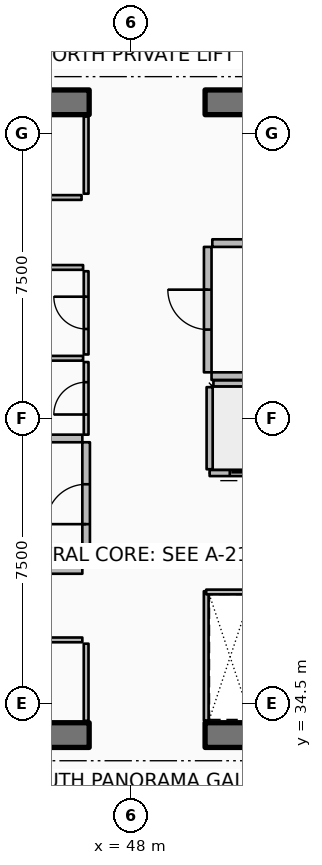
"""IFC4 building model, lengths in metres.
Left out: names, types, materials, properties, quantities, classifications, styles, units other than length and angle.
Written with IfcOpenShell. Run it as: python <this file> out.ifc"""

import sys

from ifc_helpers import new_model, si_unit, direction, frame, frame_2d, origin, place, context, subcontext, project, spatial, rectangle, extrude, element, fill, save


model = new_model("IFC4")
c1 = context("Model", 3, precision=1e-05, world=origin(), true_north=direction((0.0, 1.0)))
c2 = subcontext(c1, "Body", "Model", "MODEL_VIEW")
j1 = project(units=[si_unit("LENGTHUNIT", "METRE"), si_unit("PLANEANGLEUNIT", "RADIAN")], contexts=[c1])
p1 = place(None, origin())
s1 = spatial("IfcSite", under=j1, at=p1, CompositionType="ELEMENT")
p2 = place(p1, origin())
s2 = spatial("IfcBuilding", under=s1, at=p2, CompositionType="ELEMENT")
p3 = place(p2, frame((0.0, 0.0, 263.65)))
s3 = spatial("IfcBuildingStorey", under=s2, at=p3, CompositionType="ELEMENT", Elevation=263.65)
for number, where, z_axis, x_axis in (
    (1, (37.15, 33.675, 0.0), (0.0, 0.0, 1.0), (1.0, 0.0, 0.0)),
    (2, (49.95, 33.675, 0.0), (0.0, 0.0, 1.0), (1.0, 0.0, 0.0)),
    (3, (37.15, 50.325, 0.0), (0.0, 0.0, 1.0), (1.0, 0.0, 0.0)),
    (4, (49.95, 50.325, 0.0), (0.0, 0.0, 1.0), (1.0, 0.0, 0.0)),
):
    element("IfcWall", number, at=place(p3, frame(where, z_axis=z_axis, x_axis=x_axis)), inside=s3, PredefinedType="SHEAR", context=c2, shape_type="SweptSolid", body=[
        extrude(rectangle(XDim=9.75, YDim=0.65, at=frame_2d((4.875, 0.0))), origin(), (0.0, 0.0, 1.0), 3.85),
    ])
p4 = place(p3, frame((52.23, 40.57, 0.0), z_axis=(0.0, 0.0, 1.0), x_axis=(-1.0, 0.0, 0.0)))
e5 = element("IfcWall", 5, at=p4, inside=s3, PredefinedType="PARTITIONING", context=c2, shape_type="SweptSolid", body=[
    extrude(rectangle(XDim=2.16, YDim=0.16, at=frame_2d((1.08, 0.0))), origin(), (0.0, 0.0, 1.0), 3.59),
])
p5 = place(p4, frame((0.53, 0.0, 0.0)))
e6 = element("IfcOpeningElement", 6, at=p5, cuts=e5, PredefinedType="OPENING", context=c2, shape_type="SweptSolid", body=[
    extrude(rectangle(XDim=1.1, YDim=2.1, at=frame_2d((0.55, 1.05))), frame((0.0, 0.09, 0.0), z_axis=(0.0, -1.0, 0.0), x_axis=(1.0, 0.0, 0.0)), (0.0, 0.0, 1.0), 0.18),
])
p6 = place(p3, frame((50.07, 40.67, 0.0), z_axis=(0.0, 0.0, 1.0), x_axis=(0.0, 1.0, 0.0)))
e7 = element("IfcWall", 7, at=p6, inside=s3, PredefinedType="PARTITIONING", context=c2, shape_type="SweptSolid", body=[
    extrude(rectangle(XDim=2.16, YDim=0.16, at=frame_2d((1.08, 0.0))), origin(), (0.0, 0.0, 1.0), 3.59),
])
p7 = place(p3, frame((50.17, 42.93, 0.0), z_axis=(0.0, 0.0, 1.0), x_axis=(1.0, 0.0, 0.0)))
e8 = element("IfcWall", 8, at=p7, inside=s3, PredefinedType="PARTITIONING", context=c2, shape_type="SweptSolid", body=[
    extrude(rectangle(XDim=1.96, YDim=0.16, at=frame_2d((0.98, 0.0))), origin(), (0.0, 0.0, 1.0), 3.59),
])
p8 = place(p3, frame((46.82, 34.05, 0.0), z_axis=(0.0, 0.0, 1.0), x_axis=(0.0, 1.0, 0.0)))
e9 = element("IfcWall", 9, at=p8, inside=s3, PredefinedType="PARTITIONING", context=c2, shape_type="SweptSolid", body=[
    extrude(rectangle(XDim=2.03, YDim=0.125, at=frame_2d((1.015, 0.0))), origin(), (0.0, 0.0, 1.0), 3.03),
])
p9 = place(p3, frame((37.92, 36.18, 0.0), z_axis=(0.0, 0.0, 1.0), x_axis=(1.0, 0.0, 0.0)))
e10 = element("IfcWall", 10, at=p9, inside=s3, PredefinedType="PARTITIONING", context=c2, shape_type="SweptSolid", body=[
    extrude(rectangle(XDim=8.8, YDim=0.125, at=frame_2d((4.4, 0.0))), origin(), (0.0, 0.0, 1.0), 3.03),
])
p10 = place(p9, frame((3.975, 0.0, 0.0)))
e11 = element("IfcOpeningElement", 11, at=p10, cuts=e10, PredefinedType="OPENING", context=c2, shape_type="SweptSolid", body=[
    extrude(rectangle(XDim=0.85, YDim=2.06, at=frame_2d((0.425, 1.03))), frame((0.0, 0.073, 0.0), z_axis=(0.0, -1.0, 0.0), x_axis=(1.0, 0.0, 0.0)), (0.0, 0.0, 1.0), 0.145),
])
p11 = place(p3, frame((46.82, 47.92, 0.0), z_axis=(0.0, 0.0, 1.0), x_axis=(0.0, 1.0, 0.0)))
e12 = element("IfcWall", 12, at=p11, inside=s3, PredefinedType="PARTITIONING", context=c2, shape_type="SweptSolid", body=[
    extrude(rectangle(XDim=2.03, YDim=0.125, at=frame_2d((1.015, 0.0))), origin(), (0.0, 0.0, 1.0), 3.03),
])
p12 = place(p3, frame((42.2, 47.82, 0.0), z_axis=(0.0, 0.0, 1.0), x_axis=(1.0, 0.0, 0.0)))
e13 = element("IfcWall", 13, at=p12, inside=s3, PredefinedType="PARTITIONING", context=c2, shape_type="SweptSolid", body=[
    extrude(rectangle(XDim=4.5, YDim=0.125, at=frame_2d((2.25, 0.0))), origin(), (0.0, 0.0, 1.0), 3.03),
])
p13 = place(p12, frame((1.825, 0.0, 0.0)))
e14 = element("IfcOpeningElement", 14, at=p13, cuts=e13, PredefinedType="OPENING", context=c2, shape_type="SweptSolid", body=[
    extrude(rectangle(XDim=0.85, YDim=2.06, at=frame_2d((0.425, 1.03))), frame((0.0, 0.073, 0.0), z_axis=(0.0, -1.0, 0.0), x_axis=(1.0, 0.0, 0.0)), (0.0, 0.0, 1.0), 0.145),
])
p14 = place(p3, frame((41.35, 38.02, 0.0), z_axis=(0.0, 0.0, 1.0), x_axis=(1.0, 0.0, 0.0)))
e15 = element("IfcWall", 15, at=p14, inside=s3, PredefinedType="PARTITIONING", context=c2, shape_type="SweptSolid", body=[
    extrude(rectangle(XDim=5.37, YDim=0.2, at=frame_2d((2.685, 0.0))), origin(), (0.0, 0.0, 1.0), 3.59),
])
p15 = place(p3, frame((43.92, 41.48, 0.0), z_axis=(0.0, 0.0, 1.0), x_axis=(1.0, 0.0, 0.0)))
e16 = element("IfcWall", 16, at=p15, inside=s3, PredefinedType="PARTITIONING", context=c2, shape_type="SweptSolid", body=[
    extrude(rectangle(XDim=2.8, YDim=0.2, at=frame_2d((1.4, 0.0))), origin(), (0.0, 0.0, 1.0), 3.59),
])
p16 = place(p3, frame((46.82, 38.12, 0.0), z_axis=(0.0, 0.0, 1.0), x_axis=(0.0, 1.0, 0.0)))
e17 = element("IfcWall", 17, at=p16, inside=s3, PredefinedType="PARTITIONING", context=c2, shape_type="SweptSolid", body=[
    extrude(rectangle(XDim=3.26, YDim=0.2, at=frame_2d((1.63, 0.0))), origin(), (0.0, 0.0, 1.0), 3.59),
])
p17 = place(p16, frame((1.105, 0.0, 0.0)))
e18 = element("IfcOpeningElement", 18, at=p17, cuts=e17, PredefinedType="OPENING", context=c2, shape_type="SweptSolid", body=[
    extrude(rectangle(XDim=1.05, YDim=2.1, at=frame_2d((0.525, 1.05))), frame((0.0, 0.11, 0.0), z_axis=(0.0, -1.0, 0.0), x_axis=(1.0, 0.0, 0.0)), (0.0, 0.0, 1.0), 0.22),
])
p18 = place(p3, frame((50.12, 43.12, 0.0), z_axis=(0.0, 0.0, 1.0), x_axis=(1.0, 0.0, 0.0)))
e19 = element("IfcWall", 19, at=p18, inside=s3, PredefinedType="PARTITIONING", context=c2, shape_type="SweptSolid", body=[
    extrude(rectangle(XDim=8.88, YDim=0.2, at=frame_2d((4.44, 0.0))), origin(), (0.0, 0.0, 1.0), 3.59),
])
p19 = place(p3, frame((50.14, 46.62, 0.0), z_axis=(0.0, 0.0, 1.0), x_axis=(1.0, 0.0, 0.0)))
e20 = element("IfcWall", 20, at=p19, inside=s3, PredefinedType="PARTITIONING", context=c2, shape_type="SweptSolid", body=[
    extrude(rectangle(XDim=1.02, YDim=0.2, at=frame_2d((0.51, 0.0))), origin(), (0.0, 0.0, 1.0), 3.59),
])
p20 = place(p3, frame((50.02, 43.22, 0.0), z_axis=(0.0, 0.0, 1.0), x_axis=(0.0, 1.0, 0.0)))
e21 = element("IfcWall", 21, at=p20, inside=s3, PredefinedType="PARTITIONING", context=c2, shape_type="SweptSolid", body=[
    extrude(rectangle(XDim=3.3, YDim=0.2, at=frame_2d((1.65, 0.0))), origin(), (0.0, 0.0, 1.0), 3.59),
])
p21 = place(p20, frame((1.125, 0.0, 0.0)))
e22 = element("IfcOpeningElement", 22, at=p21, cuts=e21, PredefinedType="OPENING", context=c2, shape_type="SweptSolid", body=[
    extrude(rectangle(XDim=1.05, YDim=2.1, at=frame_2d((0.525, 1.05))), frame((0.0, 0.11, 0.0), z_axis=(0.0, -1.0, 0.0), x_axis=(1.0, 0.0, 0.0)), (0.0, 0.0, 1.0), 0.22),
])
p22 = place(p3, frame((49.98, 34.06, 0.0), z_axis=(0.0, 0.0, 1.0), x_axis=(0.0, 1.0, 0.0)))
e23 = element("IfcWall", 23, at=p22, inside=s3, PredefinedType="PARTITIONING", context=c2, shape_type="SweptSolid", body=[
    extrude(rectangle(XDim=3.4, YDim=0.125, at=frame_2d((1.7, 0.0))), origin(), (0.0, 0.0, 1.0), 3.03),
])
p23 = place(p3, frame((49.98, 37.44, 0.0), z_axis=(0.0, 0.0, 1.0), x_axis=(1.0, 0.0, 0.0)))
e24 = element("IfcWall", 24, at=p23, inside=s3, PredefinedType="PARTITIONING", context=c2, shape_type="SweptSolid", body=[
    extrude(rectangle(XDim=1.26, YDim=0.125, at=frame_2d((0.63, 0.0))), origin(), (0.0, 0.0, 1.0), 3.03),
])
p24 = place(p3, frame((44.03, 43.59, 0.0), z_axis=(0.0, 0.0, 1.0), x_axis=(1.0, 0.0, 0.0)))
e25 = element("IfcWall", 25, at=p24, inside=s3, PredefinedType="PARTITIONING", context=c2, shape_type="SweptSolid", body=[
    extrude(rectangle(XDim=2.71, YDim=0.125, at=frame_2d((1.355, 0.0))), origin(), (0.0, 0.0, 1.0), 3.03),
])
p25 = place(p3, frame((46.82, 41.58, 0.0), z_axis=(0.0, 0.0, 1.0), x_axis=(0.0, 1.0, 0.0)))
e26 = element("IfcWall", 26, at=p25, inside=s3, PredefinedType="PARTITIONING", context=c2, shape_type="SweptSolid", body=[
    extrude(rectangle(XDim=1.91, YDim=0.125, at=frame_2d((0.955, 0.0))), origin(), (0.0, 0.0, 1.0), 3.03),
])
p26 = place(p25, frame((0.53, 0.0, 0.0)))
e27 = element("IfcOpeningElement", 27, at=p26, cuts=e26, PredefinedType="OPENING", context=c2, shape_type="SweptSolid", body=[
    extrude(rectangle(XDim=0.85, YDim=2.06, at=frame_2d((0.425, 1.03))), frame((0.0, 0.073, 0.0), z_axis=(0.0, -1.0, 0.0), x_axis=(1.0, 0.0, 0.0)), (0.0, 0.0, 1.0), 0.145),
])
p27 = place(p3, frame((46.82, 43.69, 0.0), z_axis=(0.0, 0.0, 1.0), x_axis=(0.0, 1.0, 0.0)))
e28 = element("IfcWall", 28, at=p27, inside=s3, PredefinedType="PARTITIONING", context=c2, shape_type="SweptSolid", body=[
    extrude(rectangle(XDim=2.19, YDim=0.125, at=frame_2d((1.095, 0.0))), origin(), (0.0, 0.0, 1.0), 3.03),
])
p28 = place(p27, frame((0.67, 0.0, 0.0)))
e29 = element("IfcOpeningElement", 29, at=p28, cuts=e28, PredefinedType="OPENING", context=c2, shape_type="SweptSolid", body=[
    extrude(rectangle(XDim=0.85, YDim=2.06, at=frame_2d((0.425, 1.03))), frame((0.0, 0.073, 0.0), z_axis=(0.0, -1.0, 0.0), x_axis=(1.0, 0.0, 0.0)), (0.0, 0.0, 1.0), 0.145),
])
p29 = place(p3, frame((45.48, 45.98, 0.0), z_axis=(0.0, 0.0, 1.0), x_axis=(1.0, 0.0, 0.0)))
e30 = element("IfcWall", 30, at=p29, inside=s3, PredefinedType="PARTITIONING", context=c2, shape_type="SweptSolid", body=[
    extrude(rectangle(XDim=1.26, YDim=0.125, at=frame_2d((0.63, 0.0))), origin(), (0.0, 0.0, 1.0), 3.03),
])
p30 = place(p5, origin())
e31 = element("IfcDoor", 31, at=p30, inside=s3, OperationType="DOUBLE_DOOR_SLIDING", PredefinedType="DOOR", context=c2, shape_type="SweptSolid", body=[
    extrude(rectangle(XDim=1.1, YDim=2.1, at=frame_2d((0.55, 1.05))), frame((0.0, 0.025, 0.0), z_axis=(0.0, -1.0, 0.0), x_axis=(1.0, 0.0, 0.0)), (0.0, 0.0, 1.0), 0.05),
])
fill(e6, e31)
p31 = place(p17, origin())
e32 = element("IfcDoor", 32, at=p31, inside=s3, OperationType="SINGLE_SWING_LEFT", PredefinedType="DOOR", context=c2, shape_type="SweptSolid", body=[
    extrude(rectangle(XDim=1.05, YDim=2.1, at=frame_2d((0.525, 1.05))), frame((0.0, 0.025, 0.0), z_axis=(0.0, -1.0, 0.0), x_axis=(1.0, 0.0, 0.0)), (0.0, 0.0, 1.0), 0.05),
])
fill(e18, e32)
p32 = place(p21, origin())
e33 = element("IfcDoor", 33, at=p32, inside=s3, OperationType="SINGLE_SWING_RIGHT", PredefinedType="DOOR", context=c2, shape_type="SweptSolid", body=[
    extrude(rectangle(XDim=1.05, YDim=2.1, at=frame_2d((0.525, 1.05))), frame((0.0, 0.025, 0.0), z_axis=(0.0, -1.0, 0.0), x_axis=(1.0, 0.0, 0.0)), (0.0, 0.0, 1.0), 0.05),
])
fill(e22, e33)
p33 = place(p26, origin())
e34 = element("IfcDoor", 34, at=p33, inside=s3, OperationType="SINGLE_SWING_LEFT", PredefinedType="DOOR", context=c2, shape_type="SweptSolid", body=[
    extrude(rectangle(XDim=0.85, YDim=2.06, at=frame_2d((0.425, 1.03))), frame((0.0, 0.025, 0.0), z_axis=(0.0, -1.0, 0.0), x_axis=(1.0, 0.0, 0.0)), (0.0, 0.0, 1.0), 0.05),
])
fill(e27, e34)
p34 = place(p28, origin())
e35 = element("IfcDoor", 35, at=p34, inside=s3, OperationType="SINGLE_SWING_RIGHT", PredefinedType="DOOR", context=c2, shape_type="SweptSolid", body=[
    extrude(rectangle(XDim=0.85, YDim=2.06, at=frame_2d((0.425, 1.03))), frame((0.0, 0.025, 0.0), z_axis=(0.0, -1.0, 0.0), x_axis=(1.0, 0.0, 0.0)), (0.0, 0.0, 1.0), 0.05),
])
fill(e29, e35)
save(model, sys.argv[1])
